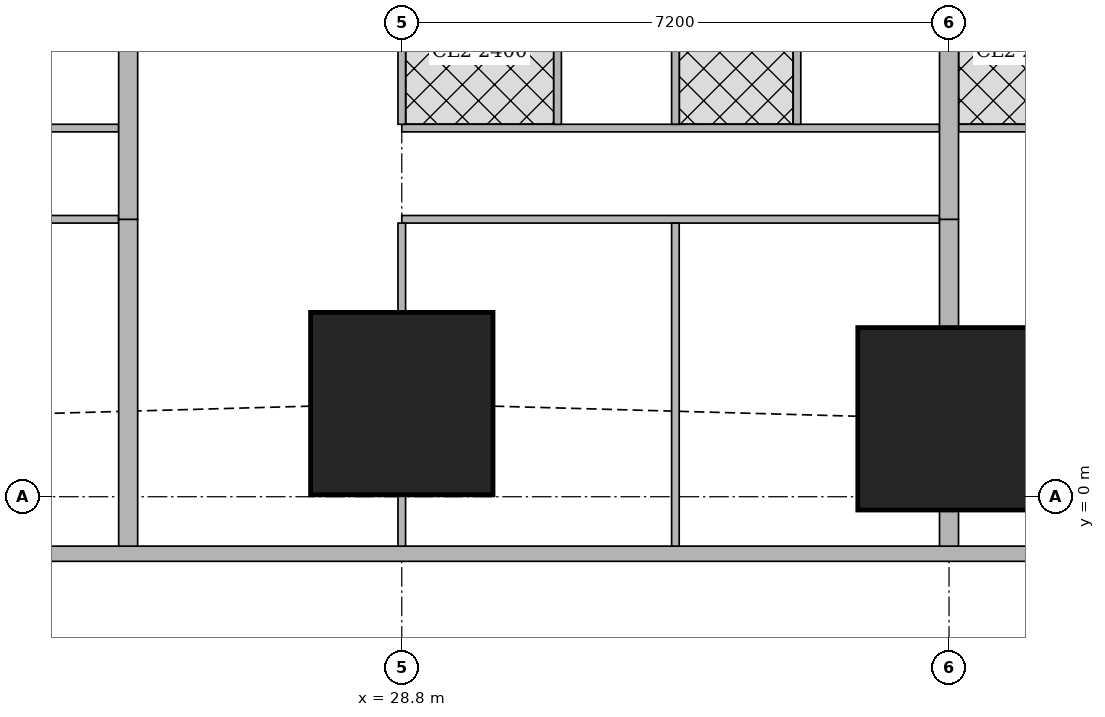
"""IFC4 building model, lengths in metres.
Left out: names, types, materials, properties, quantities, classifications, styles, units other than length and angle.
Written with IfcOpenShell. Run it as: python <this file> out.ifc"""

import sys

from ifc_helpers import new_model, si_unit, direction, frame, frame_2d, origin, origin_2d, place, context, subcontext, project, spatial, rectangle, extrude, element, fill, save


model = new_model("IFC4")
c1 = context("Model", 3, precision=1e-05, world=origin(), true_north=direction((0.0, 1.0)))
c2 = subcontext(c1, "Body", "Model", "MODEL_VIEW")
j1 = project(units=[si_unit("LENGTHUNIT", "METRE"), si_unit("PLANEANGLEUNIT", "RADIAN")], contexts=[c1])
p1 = place(None, origin())
s1 = spatial("IfcSite", under=j1, at=p1, CompositionType="ELEMENT")
p2 = place(p1, origin())
s2 = spatial("IfcBuilding", under=s1, at=p2, CompositionType="ELEMENT")
p3 = place(p2, frame((0.0, 0.0, 223.7)))
s3 = spatial("IfcBuildingStorey", under=s2, at=p3, CompositionType="ELEMENT", Elevation=223.7)
for number, where, z_axis, x_axis in (
    (1, (28.8, 1.225, 0.0), (0.0, 0.0, 1.0), (1.0, 0.0, 0.0)),
    (2, (36.0, 1.025, 0.0), (0.0, 0.0, 1.0), (1.0, 0.0, 0.0)),
):
    element("IfcColumn", number, at=place(p3, frame(where, z_axis=z_axis, x_axis=x_axis)), inside=s3, PredefinedType="COLUMN", context=c2, shape_type="SweptSolid", body=[
        extrude(rectangle(XDim=2.4, YDim=2.4, at=origin_2d()), origin(), (0.0, 0.0, 1.0), 3.75),
    ])
p4 = place(p3, frame((14.563, -0.75, 0.0), z_axis=(0.0, 0.0, 1.0), x_axis=(1.0, 0.0, 0.0)))
e3 = element("IfcWall", 3, at=p4, inside=s3, PredefinedType="SOLIDWALL", context=c2, shape_type="SweptSolid", body=[
    extrude(rectangle(XDim=33.228, YDim=0.2, at=frame_2d((16.614, 0.0))), origin(), (0.0, 0.0, 1.0), 3.5),
])
p5 = place(p4, frame((2.319, 0.0, 0.9)))
e4 = element("IfcOpeningElement", 4, at=p5, cuts=e3, PredefinedType="OPENING", context=c2, shape_type="SweptSolid", body=[
    extrude(rectangle(XDim=2.4, YDim=1.5, at=frame_2d((1.2, 0.75))), frame((0.0, 0.11, 0.0), z_axis=(0.0, -1.0, 0.0), x_axis=(1.0, 0.0, 0.0)), (0.0, 0.0, 1.0), 0.22),
])
p6 = place(p4, frame((7.937, 0.0, 0.9)))
e5 = element("IfcOpeningElement", 5, at=p6, cuts=e3, PredefinedType="OPENING", context=c2, shape_type="SweptSolid", body=[
    extrude(rectangle(XDim=1.8, YDim=1.5, at=frame_2d((0.9, 0.75))), frame((0.0, 0.11, 0.0), z_axis=(0.0, -1.0, 0.0), x_axis=(1.0, 0.0, 0.0)), (0.0, 0.0, 1.0), 0.22),
])
p7 = place(p4, frame((11.537, 0.0, 0.9)))
e6 = element("IfcOpeningElement", 6, at=p7, cuts=e3, PredefinedType="OPENING", context=c2, shape_type="SweptSolid", body=[
    extrude(rectangle(XDim=1.8, YDim=1.5, at=frame_2d((0.9, 0.75))), frame((0.0, 0.11, 0.0), z_axis=(0.0, -1.0, 0.0), x_axis=(1.0, 0.0, 0.0)), (0.0, 0.0, 1.0), 0.22),
])
p8 = place(p4, frame((15.137, 0.0, 0.9)))
e7 = element("IfcOpeningElement", 7, at=p8, cuts=e3, PredefinedType="OPENING", context=c2, shape_type="SweptSolid", body=[
    extrude(rectangle(XDim=1.8, YDim=1.5, at=frame_2d((0.9, 0.75))), frame((0.0, 0.11, 0.0), z_axis=(0.0, -1.0, 0.0), x_axis=(1.0, 0.0, 0.0)), (0.0, 0.0, 1.0), 0.22),
])
p9 = place(p4, frame((18.737, 0.0, 0.9)))
e8 = element("IfcOpeningElement", 8, at=p9, cuts=e3, PredefinedType="OPENING", context=c2, shape_type="SweptSolid", body=[
    extrude(rectangle(XDim=1.8, YDim=1.5, at=frame_2d((0.9, 0.75))), frame((0.0, 0.11, 0.0), z_axis=(0.0, -1.0, 0.0), x_axis=(1.0, 0.0, 0.0)), (0.0, 0.0, 1.0), 0.22),
])
p10 = place(p4, frame((22.337, 0.0, 0.9)))
e9 = element("IfcOpeningElement", 9, at=p10, cuts=e3, PredefinedType="OPENING", context=c2, shape_type="SweptSolid", body=[
    extrude(rectangle(XDim=1.8, YDim=1.5, at=frame_2d((0.9, 0.75))), frame((0.0, 0.11, 0.0), z_axis=(0.0, -1.0, 0.0), x_axis=(1.0, 0.0, 0.0)), (0.0, 0.0, 1.0), 0.22),
])
p11 = place(p3, frame((33.68, 42.723, 0.0), z_axis=(0.0, 0.0, 1.0), x_axis=(0.185601160014, -0.982625162207, 0.0)))
e10 = element("IfcWall", 10, at=p11, inside=s3, PredefinedType="SOLIDWALL", context=c2, shape_type="SweptSolid", body=[
    extrude(rectangle(XDim=41.051, YDim=0.15, at=frame_2d((20.526, 0.0))), origin(), (0.0, 0.0, 1.0), 2.5),
])
p12 = place(p11, frame((16.123, 0.0, 0.0)))
e11 = element("IfcOpeningElement", 11, at=p12, cuts=e10, PredefinedType="OPENING", context=c2, shape_type="SweptSolid", body=[
    extrude(rectangle(XDim=1.0, YDim=2.1, at=frame_2d((0.5, 1.05))), frame((0.0, 0.085, 0.0), z_axis=(0.0, -1.0, 0.0), x_axis=(1.0, 0.0, 0.0)), (0.0, 0.0, 1.0), 0.17),
])
p13 = place(p11, frame((19.938, 0.0, 0.0)))
e12 = element("IfcOpeningElement", 12, at=p13, cuts=e10, PredefinedType="OPENING", context=c2, shape_type="SweptSolid", body=[
    extrude(rectangle(XDim=1.0, YDim=2.1, at=frame_2d((0.5, 1.05))), frame((0.0, 0.085, 0.0), z_axis=(0.0, -1.0, 0.0), x_axis=(1.0, 0.0, 0.0)), (0.0, 0.0, 1.0), 0.17),
])
p14 = place(p11, frame((30.902, 0.0, 0.0)))
e13 = element("IfcOpeningElement", 13, at=p14, cuts=e10, PredefinedType="OPENING", context=c2, shape_type="SweptSolid", body=[
    extrude(rectangle(XDim=1.0, YDim=2.1, at=frame_2d((0.5, 1.05))), frame((0.0, 0.085, 0.0), z_axis=(0.0, -1.0, 0.0), x_axis=(1.0, 0.0, 0.0)), (0.0, 0.0, 1.0), 0.17),
])
p15 = place(p3, frame((25.075, 3.65, 0.0), z_axis=(0.0, 0.0, 1.0), x_axis=(-1.0, 0.0, 0.0)))
e14 = element("IfcWall", 14, at=p15, inside=s3, PredefinedType="PARTITIONING", context=c2, shape_type="SweptSolid", body=[
    extrude(rectangle(XDim=3.475, YDim=0.1, at=frame_2d((1.737, 0.0))), origin(), (0.0, 0.0, 1.0), 3.5),
])
p16 = place(p15, frame((2.375, 0.0, 0.0)))
e15 = element("IfcOpeningElement", 15, at=p16, cuts=e14, PredefinedType="OPENING", context=c2, shape_type="SweptSolid", body=[
    extrude(rectangle(XDim=0.9, YDim=2.1, at=frame_2d((0.45, 1.05))), frame((0.0, 0.06, 0.0), z_axis=(0.0, -1.0, 0.0), x_axis=(1.0, 0.0, 0.0)), (0.0, 0.0, 1.0), 0.12),
])
p17 = place(p3, frame((25.075, 4.85, 0.0), z_axis=(0.0, 0.0, 1.0), x_axis=(-1.0, 0.0, 0.0)))
e16 = element("IfcWall", 16, at=p17, inside=s3, PredefinedType="PARTITIONING", context=c2, shape_type="SweptSolid", body=[
    extrude(rectangle(XDim=3.475, YDim=0.1, at=frame_2d((1.737, 0.0))), origin(), (0.0, 0.0, 1.0), 3.5),
])
p18 = place(p17, frame((2.0, 0.0, 0.0)))
e17 = element("IfcOpeningElement", 17, at=p18, cuts=e16, PredefinedType="OPENING", context=c2, shape_type="SweptSolid", body=[
    extrude(rectangle(XDim=0.9, YDim=2.1, at=frame_2d((0.45, 1.05))), frame((0.0, 0.06, 0.0), z_axis=(0.0, -1.0, 0.0), x_axis=(1.0, 0.0, 0.0)), (0.0, 0.0, 1.0), 0.12),
])
p19 = place(p17, frame((0.2, 0.0, 0.0)))
e18 = element("IfcOpeningElement", 18, at=p19, cuts=e16, PredefinedType="OPENING", context=c2, shape_type="SweptSolid", body=[
    extrude(rectangle(XDim=0.9, YDim=2.1, at=frame_2d((0.45, 1.05))), frame((0.0, 0.06, 0.0), z_axis=(0.0, -1.0, 0.0), x_axis=(1.0, 0.0, 0.0)), (0.0, 0.0, 1.0), 0.12),
])
p20 = place(p3, frame((35.875, 3.65, 0.0), z_axis=(0.0, 0.0, 1.0), x_axis=(-1.0, 0.0, 0.0)))
e19 = element("IfcWall", 19, at=p20, inside=s3, PredefinedType="PARTITIONING", context=c2, shape_type="SweptSolid", body=[
    extrude(rectangle(XDim=7.075, YDim=0.1, at=frame_2d((3.538, 0.0))), origin(), (0.0, 0.0, 1.0), 3.5),
])
p21 = place(p20, frame((4.95, 0.0, 0.0)))
e20 = element("IfcOpeningElement", 20, at=p21, cuts=e19, PredefinedType="OPENING", context=c2, shape_type="SweptSolid", body=[
    extrude(rectangle(XDim=0.9, YDim=2.1, at=frame_2d((0.45, 1.05))), frame((0.0, 0.06, 0.0), z_axis=(0.0, -1.0, 0.0), x_axis=(1.0, 0.0, 0.0)), (0.0, 0.0, 1.0), 0.12),
])
p22 = place(p20, frame((2.375, 0.0, 0.0)))
e21 = element("IfcOpeningElement", 21, at=p22, cuts=e19, PredefinedType="OPENING", context=c2, shape_type="SweptSolid", body=[
    extrude(rectangle(XDim=0.9, YDim=2.1, at=frame_2d((0.45, 1.05))), frame((0.0, 0.06, 0.0), z_axis=(0.0, -1.0, 0.0), x_axis=(1.0, 0.0, 0.0)), (0.0, 0.0, 1.0), 0.12),
])
p23 = place(p3, frame((35.875, 4.85, 0.0), z_axis=(0.0, 0.0, 1.0), x_axis=(-1.0, 0.0, 0.0)))
e22 = element("IfcWall", 22, at=p23, inside=s3, PredefinedType="PARTITIONING", context=c2, shape_type="SweptSolid", body=[
    extrude(rectangle(XDim=7.075, YDim=0.1, at=frame_2d((3.538, 0.0))), origin(), (0.0, 0.0, 1.0), 3.5),
])
p24 = place(p23, frame((5.6, 0.0, 0.0)))
e23 = element("IfcOpeningElement", 23, at=p24, cuts=e22, PredefinedType="OPENING", context=c2, shape_type="SweptSolid", body=[
    extrude(rectangle(XDim=0.9, YDim=2.1, at=frame_2d((0.45, 1.05))), frame((0.0, 0.06, 0.0), z_axis=(0.0, -1.0, 0.0), x_axis=(1.0, 0.0, 0.0)), (0.0, 0.0, 1.0), 0.12),
])
p25 = place(p23, frame((2.225, 0.0, 0.0)))
e24 = element("IfcOpeningElement", 24, at=p25, cuts=e22, PredefinedType="OPENING", context=c2, shape_type="SweptSolid", body=[
    extrude(rectangle(XDim=0.9, YDim=2.1, at=frame_2d((0.45, 1.05))), frame((0.0, 0.06, 0.0), z_axis=(0.0, -1.0, 0.0), x_axis=(1.0, 0.0, 0.0)), (0.0, 0.0, 1.0), 0.12),
])
p26 = place(p23, frame((3.8, 0.0, 0.0)))
e25 = element("IfcOpeningElement", 25, at=p26, cuts=e22, PredefinedType="OPENING", context=c2, shape_type="SweptSolid", body=[
    extrude(rectangle(XDim=0.9, YDim=2.1, at=frame_2d((0.45, 1.05))), frame((0.0, 0.06, 0.0), z_axis=(0.0, -1.0, 0.0), x_axis=(1.0, 0.0, 0.0)), (0.0, 0.0, 1.0), 0.12),
])
p27 = place(p23, frame((0.425, 0.0, 0.0)))
e26 = element("IfcOpeningElement", 26, at=p27, cuts=e22, PredefinedType="OPENING", context=c2, shape_type="SweptSolid", body=[
    extrude(rectangle(XDim=0.9, YDim=2.1, at=frame_2d((0.45, 1.05))), frame((0.0, 0.06, 0.0), z_axis=(0.0, -1.0, 0.0), x_axis=(1.0, 0.0, 0.0)), (0.0, 0.0, 1.0), 0.12),
])
p28 = place(p3, frame((28.8, -0.65, 0.0), z_axis=(0.0, 0.0, 1.0), x_axis=(0.0, 1.0, 0.0)))
e27 = element("IfcWall", 27, at=p28, inside=s3, PredefinedType="PARTITIONING", context=c2, shape_type="SweptSolid", body=[
    extrude(rectangle(XDim=0.674, YDim=0.1, at=frame_2d((0.337, 0.0))), origin(), (0.0, 0.0, 1.0), 3.5),
])
p29 = place(p3, frame((28.8, 2.426, 0.0), z_axis=(0.0, 0.0, 1.0), x_axis=(0.0, 1.0, 0.0)))
e28 = element("IfcWall", 28, at=p29, inside=s3, PredefinedType="PARTITIONING", context=c2, shape_type="SweptSolid", body=[
    extrude(rectangle(XDim=1.174, YDim=0.1, at=frame_2d((0.587, 0.0))), origin(), (0.0, 0.0, 1.0), 3.5),
])
p30 = place(p3, frame((32.4, -0.65, 0.0), z_axis=(0.0, 0.0, 1.0), x_axis=(0.0, 1.0, 0.0)))
e29 = element("IfcWall", 29, at=p30, inside=s3, PredefinedType="PARTITIONING", context=c2, shape_type="SweptSolid", body=[
    extrude(rectangle(XDim=4.25, YDim=0.1, at=frame_2d((2.125, 0.0))), origin(), (0.0, 0.0, 1.0), 2.05),
])
p31 = place(p3, frame((28.8, 4.9, 0.0), z_axis=(0.0, 0.0, 1.0), x_axis=(0.0, 1.0, 0.0)))
e30 = element("IfcWall", 30, at=p31, inside=s3, PredefinedType="PARTITIONING", context=c2, shape_type="SweptSolid", body=[
    extrude(rectangle(XDim=1.899, YDim=0.1, at=frame_2d((0.95, 0.0))), origin(), (0.0, 0.0, 1.0), 3.5),
])
for number, where, z_axis, x_axis in (
    (31, (32.4, 4.9, 0.0), (0.0, 0.0, 1.0), (0.0, 1.0, 0.0)),
    (32, (30.85, 4.9, 0.0), (0.0, 0.0, 1.0), (0.0, 1.0, 0.0)),
    (33, (34.0, 4.9, 0.0), (0.0, 0.0, 1.0), (0.0, 1.0, 0.0)),
):
    element("IfcWall", number, at=place(p3, frame(where, z_axis=z_axis, x_axis=x_axis)), inside=s3, PredefinedType="PARTITIONING", context=c2, shape_type="SweptSolid", body=[
        extrude(rectangle(XDim=3.525, YDim=0.1, at=frame_2d((1.763, 0.0))), origin(), (0.0, 0.0, 1.0), 3.5),
    ])
p32 = place(p3, frame((25.2, -0.65, 0.0), z_axis=(0.0, 0.0, 1.0), x_axis=(0.0, 1.0, 0.0)))
e34 = element("IfcWall", 34, at=p32, inside=s3, PredefinedType="SOLIDWALL", context=c2, shape_type="SweptSolid", body=[
    extrude(rectangle(XDim=4.3, YDim=0.25, at=frame_2d((2.15, 0.0))), origin(), (0.0, 0.0, 1.0), 2.05),
])
p33 = place(p3, frame((25.2, 3.65, 0.0), z_axis=(0.0, 0.0, 1.0), x_axis=(0.0, 1.0, 0.0)))
e35 = element("IfcWall", 35, at=p33, inside=s3, PredefinedType="SOLIDWALL", context=c2, shape_type="SweptSolid", body=[
    extrude(rectangle(XDim=4.775, YDim=0.25, at=frame_2d((2.388, 0.0))), origin(), (0.0, 0.0, 1.0), 3.5),
])
p34 = place(p3, frame((37.89, 4.85, 0.0), z_axis=(0.0, 0.0, 1.0), x_axis=(-1.0, 0.0, 0.0)))
e36 = element("IfcWall", 36, at=p34, inside=s3, PredefinedType="PARTITIONING", context=c2, shape_type="SweptSolid", body=[
    extrude(rectangle(XDim=1.765, YDim=0.1, at=frame_2d((0.882, 0.0))), origin(), (0.0, 0.0, 1.0), 3.5),
])
p35 = place(p34, frame((0.49, 0.0, 0.0)))
e37 = element("IfcOpeningElement", 37, at=p35, cuts=e36, PredefinedType="OPENING", context=c2, shape_type="SweptSolid", body=[
    extrude(rectangle(XDim=0.9, YDim=2.1, at=frame_2d((0.45, 1.05))), frame((0.0, 0.06, 0.0), z_axis=(0.0, -1.0, 0.0), x_axis=(1.0, 0.0, 0.0)), (0.0, 0.0, 1.0), 0.12),
])
p36 = place(p3, frame((36.0, -0.65, 0.0), z_axis=(0.0, 0.0, 1.0), x_axis=(0.0, 1.0, 0.0)))
e38 = element("IfcWall", 38, at=p36, inside=s3, PredefinedType="SOLIDWALL", context=c2, shape_type="SweptSolid", body=[
    extrude(rectangle(XDim=0.474, YDim=0.25, at=frame_2d((0.237, 0.0))), origin(), (0.0, 0.0, 1.0), 2.05),
])
p37 = place(p3, frame((36.0, 2.226, 0.0), z_axis=(0.0, 0.0, 1.0), x_axis=(0.0, 1.0, 0.0)))
e39 = element("IfcWall", 39, at=p37, inside=s3, PredefinedType="SOLIDWALL", context=c2, shape_type="SweptSolid", body=[
    extrude(rectangle(XDim=1.424, YDim=0.25, at=frame_2d((0.712, 0.0))), origin(), (0.0, 0.0, 1.0), 2.05),
])
p38 = place(p3, frame((36.0, 3.65, 0.0), z_axis=(0.0, 0.0, 1.0), x_axis=(0.0, 1.0, 0.0)))
e40 = element("IfcWall", 40, at=p38, inside=s3, PredefinedType="SOLIDWALL", context=c2, shape_type="SweptSolid", body=[
    extrude(rectangle(XDim=3.149, YDim=0.25, at=frame_2d((1.575, 0.0))), origin(), (0.0, 0.0, 1.0), 3.5),
])
p39 = place(p6, origin())
e41 = element("IfcWindow", 41, at=p39, inside=s3, PartitioningType="SINGLE_PANEL", PredefinedType="WINDOW", context=c2, shape_type="SweptSolid", body=[
    extrude(rectangle(XDim=1.8, YDim=1.5, at=frame_2d((0.9, 0.75))), frame((0.0, 0.03, 0.0), z_axis=(0.0, -1.0, 0.0), x_axis=(1.0, 0.0, 0.0)), (0.0, 0.0, 1.0), 0.06),
])
fill(e5, e41)
p40 = place(p7, origin())
e42 = element("IfcWindow", 42, at=p40, inside=s3, PartitioningType="SINGLE_PANEL", PredefinedType="WINDOW", context=c2, shape_type="SweptSolid", body=[
    extrude(rectangle(XDim=1.8, YDim=1.5, at=frame_2d((0.9, 0.75))), frame((0.0, 0.03, 0.0), z_axis=(0.0, -1.0, 0.0), x_axis=(1.0, 0.0, 0.0)), (0.0, 0.0, 1.0), 0.06),
])
fill(e6, e42)
p41 = place(p8, origin())
e43 = element("IfcWindow", 43, at=p41, inside=s3, PartitioningType="SINGLE_PANEL", PredefinedType="WINDOW", context=c2, shape_type="SweptSolid", body=[
    extrude(rectangle(XDim=1.8, YDim=1.5, at=frame_2d((0.9, 0.75))), frame((0.0, 0.03, 0.0), z_axis=(0.0, -1.0, 0.0), x_axis=(1.0, 0.0, 0.0)), (0.0, 0.0, 1.0), 0.06),
])
fill(e7, e43)
p42 = place(p9, origin())
e44 = element("IfcWindow", 44, at=p42, inside=s3, PartitioningType="SINGLE_PANEL", PredefinedType="WINDOW", context=c2, shape_type="SweptSolid", body=[
    extrude(rectangle(XDim=1.8, YDim=1.5, at=frame_2d((0.9, 0.75))), frame((0.0, 0.03, 0.0), z_axis=(0.0, -1.0, 0.0), x_axis=(1.0, 0.0, 0.0)), (0.0, 0.0, 1.0), 0.06),
])
fill(e8, e44)
p43 = place(p10, origin())
e45 = element("IfcWindow", 45, at=p43, inside=s3, PartitioningType="SINGLE_PANEL", PredefinedType="WINDOW", context=c2, shape_type="SweptSolid", body=[
    extrude(rectangle(XDim=1.8, YDim=1.5, at=frame_2d((0.9, 0.75))), frame((0.0, 0.03, 0.0), z_axis=(0.0, -1.0, 0.0), x_axis=(1.0, 0.0, 0.0)), (0.0, 0.0, 1.0), 0.06),
])
fill(e9, e45)
p44 = place(p19, origin())
e46 = element("IfcDoor", 46, at=p44, inside=s3, OperationType="SINGLE_SWING_RIGHT", PredefinedType="DOOR", context=c2, shape_type="SweptSolid", body=[
    extrude(rectangle(XDim=0.9, YDim=2.1, at=frame_2d((0.45, 1.05))), frame((0.0, 0.025, 0.0), z_axis=(0.0, -1.0, 0.0), x_axis=(1.0, 0.0, 0.0)), (0.0, 0.0, 1.0), 0.05),
])
fill(e18, e46)
p45 = place(p21, origin())
e47 = element("IfcDoor", 47, at=p45, inside=s3, OperationType="SINGLE_SWING_RIGHT", PredefinedType="DOOR", context=c2, shape_type="SweptSolid", body=[
    extrude(rectangle(XDim=0.9, YDim=2.1, at=frame_2d((0.45, 1.05))), frame((0.0, 0.025, 0.0), z_axis=(0.0, -1.0, 0.0), x_axis=(1.0, 0.0, 0.0)), (0.0, 0.0, 1.0), 0.05),
])
fill(e20, e47)
p46 = place(p22, origin())
e48 = element("IfcDoor", 48, at=p46, inside=s3, OperationType="SINGLE_SWING_RIGHT", PredefinedType="DOOR", context=c2, shape_type="SweptSolid", body=[
    extrude(rectangle(XDim=0.9, YDim=2.1, at=frame_2d((0.45, 1.05))), frame((0.0, 0.025, 0.0), z_axis=(0.0, -1.0, 0.0), x_axis=(1.0, 0.0, 0.0)), (0.0, 0.0, 1.0), 0.05),
])
fill(e21, e48)
p47 = place(p24, origin())
e49 = element("IfcDoor", 49, at=p47, inside=s3, OperationType="SINGLE_SWING_LEFT", PredefinedType="DOOR", context=c2, shape_type="SweptSolid", body=[
    extrude(rectangle(XDim=0.9, YDim=2.1, at=frame_2d((0.45, 1.05))), frame((0.0, 0.025, 0.0), z_axis=(0.0, -1.0, 0.0), x_axis=(1.0, 0.0, 0.0)), (0.0, 0.0, 1.0), 0.05),
])
fill(e23, e49)
p48 = place(p25, origin())
e50 = element("IfcDoor", 50, at=p48, inside=s3, OperationType="SINGLE_SWING_LEFT", PredefinedType="DOOR", context=c2, shape_type="SweptSolid", body=[
    extrude(rectangle(XDim=0.9, YDim=2.1, at=frame_2d((0.45, 1.05))), frame((0.0, 0.025, 0.0), z_axis=(0.0, -1.0, 0.0), x_axis=(1.0, 0.0, 0.0)), (0.0, 0.0, 1.0), 0.05),
])
fill(e24, e50)
p49 = place(p26, origin())
e51 = element("IfcDoor", 51, at=p49, inside=s3, OperationType="SINGLE_SWING_LEFT", PredefinedType="DOOR", context=c2, shape_type="SweptSolid", body=[
    extrude(rectangle(XDim=0.9, YDim=2.1, at=frame_2d((0.45, 1.05))), frame((0.0, 0.025, 0.0), z_axis=(0.0, -1.0, 0.0), x_axis=(1.0, 0.0, 0.0)), (0.0, 0.0, 1.0), 0.05),
])
fill(e25, e51)
p50 = place(p27, origin())
e52 = element("IfcDoor", 52, at=p50, inside=s3, OperationType="SINGLE_SWING_RIGHT", PredefinedType="DOOR", context=c2, shape_type="SweptSolid", body=[
    extrude(rectangle(XDim=0.9, YDim=2.1, at=frame_2d((0.45, 1.05))), frame((0.0, 0.025, 0.0), z_axis=(0.0, -1.0, 0.0), x_axis=(1.0, 0.0, 0.0)), (0.0, 0.0, 1.0), 0.05),
])
fill(e26, e52)
p51 = place(p35, origin())
e53 = element("IfcDoor", 53, at=p51, inside=s3, OperationType="SINGLE_SWING_LEFT", PredefinedType="DOOR", context=c2, shape_type="SweptSolid", body=[
    extrude(rectangle(XDim=0.9, YDim=2.1, at=frame_2d((0.45, 1.05))), frame((0.0, 0.025, 0.0), z_axis=(0.0, -1.0, 0.0), x_axis=(1.0, 0.0, 0.0)), (0.0, 0.0, 1.0), 0.05),
])
fill(e37, e53)
save(model, sys.argv[1])
